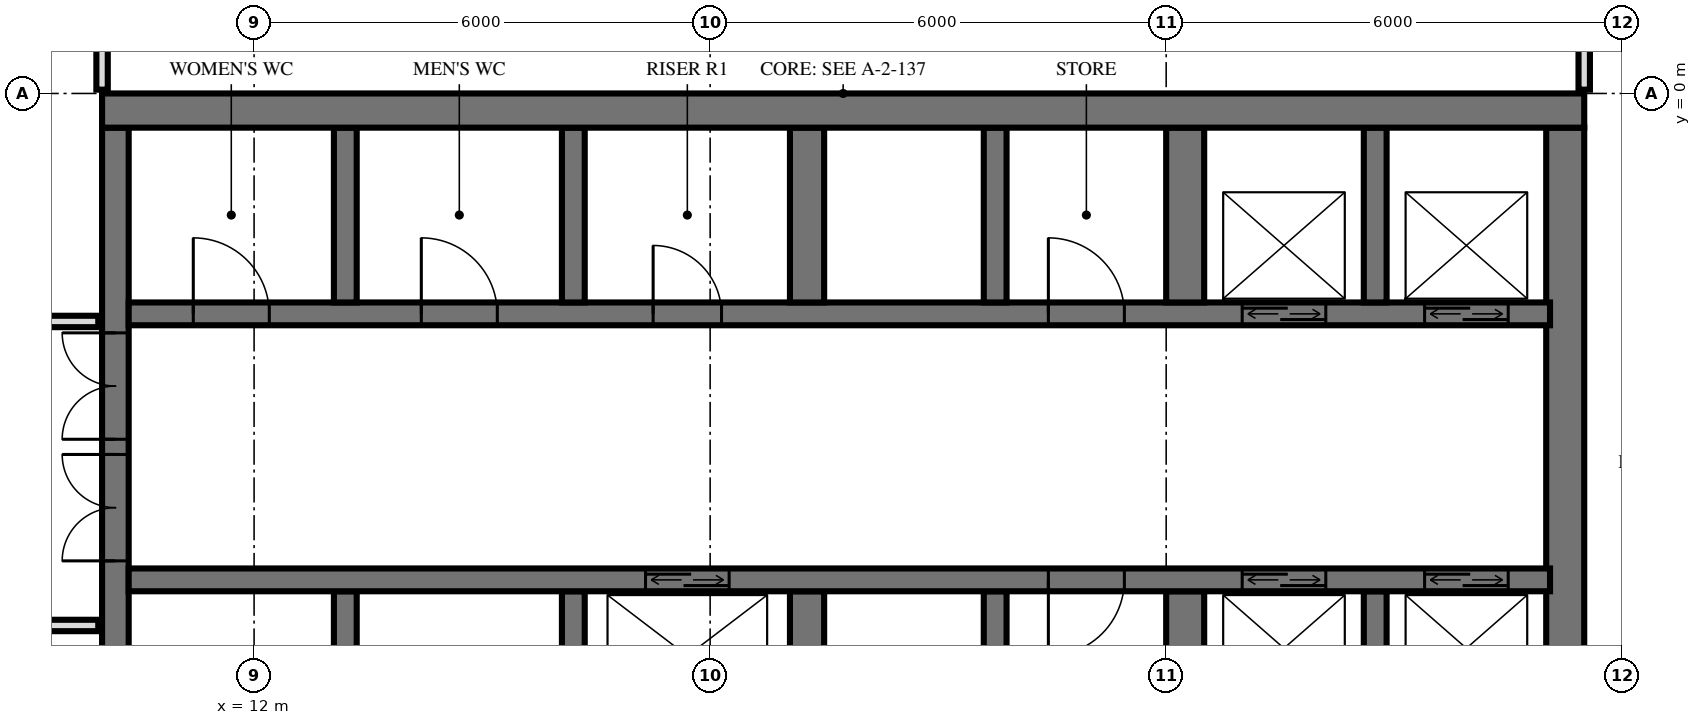
"""IFC4 building model, lengths in metres.
Left out: names, types, materials, properties, quantities, classifications, styles, units other than length and angle.
Written with IfcOpenShell. Run it as: python <this file> out.ifc"""

import sys

from ifc_helpers import new_model, si_unit, direction, frame, frame_2d, origin, place, context, subcontext, project, spatial, rectangle, extrude, element, fill, save


model = new_model("IFC4")
c1 = context("Model", 3, precision=1e-05, world=origin(), true_north=direction((0.0, 1.0)))
c2 = subcontext(c1, "Body", "Model", "MODEL_VIEW")
j1 = project(units=[si_unit("LENGTHUNIT", "METRE"), si_unit("PLANEANGLEUNIT", "RADIAN")], contexts=[c1])
p1 = place(None, origin())
s1 = spatial("IfcSite", under=j1, at=p1, CompositionType="ELEMENT")
p2 = place(p1, origin())
s2 = spatial("IfcBuilding", under=s1, at=p2, CompositionType="ELEMENT")
p3 = place(p2, frame((0.0, 0.0, 60.0)))
s3 = spatial("IfcBuildingStorey", under=s2, at=p3, CompositionType="ELEMENT", Elevation=60.0)
p4 = place(p3, frame((10.0, -0.225, 0.0), z_axis=(0.0, 0.0, 1.0), x_axis=(1.0, 0.0, 0.0)))
e1 = element("IfcWall", 1, at=p4, inside=s3, PredefinedType="SHEAR", context=c2, shape_type="SweptSolid", body=[
    extrude(rectangle(XDim=19.5, YDim=0.45, at=frame_2d((9.75, 0.0))), origin(), (0.0, 0.0, 1.0), 3.6),
])
p5 = place(p3, frame((10.175, -14.55, 0.0), z_axis=(0.0, 0.0, 1.0), x_axis=(0.0, 1.0, 0.0)))
e2 = element("IfcWall", 2, at=p5, inside=s3, PredefinedType="SHEAR", context=c2, shape_type="SweptSolid", body=[
    extrude(rectangle(XDim=14.1, YDim=0.35, at=frame_2d((7.05, 0.0))), origin(), (0.0, 0.0, 1.0), 3.6),
])
p6 = place(p5, frame((8.4, 0.0, 0.0)))
e3 = element("IfcOpeningElement", 3, at=p6, cuts=e2, PredefinedType="OPENING", context=c2, shape_type="SweptSolid", body=[
    extrude(rectangle(XDim=1.4, YDim=2.4, at=frame_2d((0.7, 1.2))), frame((0.0, 0.185, 0.0), z_axis=(0.0, -1.0, 0.0), x_axis=(1.0, 0.0, 0.0)), (0.0, 0.0, 1.0), 0.37),
])
p7 = place(p5, frame((10.0, 0.0, 0.0)))
e4 = element("IfcOpeningElement", 4, at=p7, cuts=e2, PredefinedType="OPENING", context=c2, shape_type="SweptSolid", body=[
    extrude(rectangle(XDim=1.4, YDim=2.4, at=frame_2d((0.7, 1.2))), frame((0.0, 0.185, 0.0), z_axis=(0.0, -1.0, 0.0), x_axis=(1.0, 0.0, 0.0)), (0.0, 0.0, 1.0), 0.37),
])
p8 = place(p5, frame((4.0, 0.0, 0.0)))
e5 = element("IfcOpeningElement", 5, at=p8, cuts=e2, PredefinedType="OPENING", context=c2, shape_type="SweptSolid", body=[
    extrude(rectangle(XDim=1.2, YDim=2.1, at=frame_2d((0.6, 1.05))), frame((0.0, 0.185, 0.0), z_axis=(0.0, -1.0, 0.0), x_axis=(1.0, 0.0, 0.0)), (0.0, 0.0, 1.0), 0.37),
])
p9 = place(p3, frame((29.25, -14.55, 0.0), z_axis=(0.0, 0.0, 1.0), x_axis=(0.0, 1.0, 0.0)))
e6 = element("IfcWall", 6, at=p9, inside=s3, PredefinedType="SHEAR", context=c2, shape_type="SweptSolid", body=[
    extrude(rectangle(XDim=14.1, YDim=0.5, at=frame_2d((7.05, 0.0))), origin(), (0.0, 0.0, 1.0), 3.6),
])
p10 = place(p3, frame((10.35, -2.9, 0.0), z_axis=(0.0, 0.0, 1.0), x_axis=(1.0, 0.0, 0.0)))
e7 = element("IfcWall", 7, at=p10, inside=s3, PredefinedType="SHEAR", context=c2, shape_type="SweptSolid", body=[
    extrude(rectangle(XDim=18.7, YDim=0.3, at=frame_2d((9.35, 0.0))), origin(), (0.0, 0.0, 1.0), 3.6),
])
p11 = place(p10, frame((14.65, 0.0, 0.0)))
e8 = element("IfcOpeningElement", 8, at=p11, cuts=e7, PredefinedType="OPENING", context=c2, shape_type="SweptSolid", body=[
    extrude(rectangle(XDim=1.1, YDim=2.1, at=frame_2d((0.55, 1.05))), frame((0.0, 0.16, 0.0), z_axis=(0.0, -1.0, 0.0), x_axis=(1.0, 0.0, 0.0)), (0.0, 0.0, 1.0), 0.32),
])
p12 = place(p10, frame((17.05, 0.0, 0.0)))
e9 = element("IfcOpeningElement", 9, at=p12, cuts=e7, PredefinedType="OPENING", context=c2, shape_type="SweptSolid", body=[
    extrude(rectangle(XDim=1.1, YDim=2.1, at=frame_2d((0.55, 1.05))), frame((0.0, 0.16, 0.0), z_axis=(0.0, -1.0, 0.0), x_axis=(1.0, 0.0, 0.0)), (0.0, 0.0, 1.0), 0.32),
])
p13 = place(p10, frame((6.9, 0.0, 0.0)))
e10 = element("IfcOpeningElement", 10, at=p13, cuts=e7, PredefinedType="OPENING", context=c2, shape_type="SweptSolid", body=[
    extrude(rectangle(XDim=0.9, YDim=2.1, at=frame_2d((0.45, 1.05))), frame((0.0, 0.16, 0.0), z_axis=(0.0, -1.0, 0.0), x_axis=(1.0, 0.0, 0.0)), (0.0, 0.0, 1.0), 0.32),
])
p14 = place(p10, frame((0.85, 0.0, 0.0)))
e11 = element("IfcOpeningElement", 11, at=p14, cuts=e7, PredefinedType="OPENING", context=c2, shape_type="SweptSolid", body=[
    extrude(rectangle(XDim=1.0, YDim=2.1, at=frame_2d((0.5, 1.05))), frame((0.0, 0.16, 0.0), z_axis=(0.0, -1.0, 0.0), x_axis=(1.0, 0.0, 0.0)), (0.0, 0.0, 1.0), 0.32),
])
p15 = place(p10, frame((3.85, 0.0, 0.0)))
e12 = element("IfcOpeningElement", 12, at=p15, cuts=e7, PredefinedType="OPENING", context=c2, shape_type="SweptSolid", body=[
    extrude(rectangle(XDim=1.0, YDim=2.1, at=frame_2d((0.5, 1.05))), frame((0.0, 0.16, 0.0), z_axis=(0.0, -1.0, 0.0), x_axis=(1.0, 0.0, 0.0)), (0.0, 0.0, 1.0), 0.32),
])
p16 = place(p10, frame((12.1, 0.0, 0.0)))
e13 = element("IfcOpeningElement", 13, at=p16, cuts=e7, PredefinedType="OPENING", context=c2, shape_type="SweptSolid", body=[
    extrude(rectangle(XDim=1.0, YDim=2.1, at=frame_2d((0.5, 1.05))), frame((0.0, 0.16, 0.0), z_axis=(0.0, -1.0, 0.0), x_axis=(1.0, 0.0, 0.0)), (0.0, 0.0, 1.0), 0.32),
])
p17 = place(p3, frame((10.35, -6.4, 0.0), z_axis=(0.0, 0.0, 1.0), x_axis=(1.0, 0.0, 0.0)))
e14 = element("IfcWall", 14, at=p17, inside=s3, PredefinedType="SHEAR", context=c2, shape_type="SweptSolid", body=[
    extrude(rectangle(XDim=18.7, YDim=0.3, at=frame_2d((9.35, 0.0))), origin(), (0.0, 0.0, 1.0), 3.6),
])
p18 = place(p17, frame((14.65, 0.0, 0.0)))
e15 = element("IfcOpeningElement", 15, at=p18, cuts=e14, PredefinedType="OPENING", context=c2, shape_type="SweptSolid", body=[
    extrude(rectangle(XDim=1.1, YDim=2.1, at=frame_2d((0.55, 1.05))), frame((0.0, 0.16, 0.0), z_axis=(0.0, -1.0, 0.0), x_axis=(1.0, 0.0, 0.0)), (0.0, 0.0, 1.0), 0.32),
])
p19 = place(p17, frame((17.05, 0.0, 0.0)))
e16 = element("IfcOpeningElement", 16, at=p19, cuts=e14, PredefinedType="OPENING", context=c2, shape_type="SweptSolid", body=[
    extrude(rectangle(XDim=1.1, YDim=2.1, at=frame_2d((0.55, 1.05))), frame((0.0, 0.16, 0.0), z_axis=(0.0, -1.0, 0.0), x_axis=(1.0, 0.0, 0.0)), (0.0, 0.0, 1.0), 0.32),
])
p20 = place(p17, frame((6.8, 0.0, 0.0)))
e17 = element("IfcOpeningElement", 17, at=p20, cuts=e14, PredefinedType="OPENING", context=c2, shape_type="SweptSolid", body=[
    extrude(rectangle(XDim=1.1, YDim=2.1, at=frame_2d((0.55, 1.05))), frame((0.0, 0.16, 0.0), z_axis=(0.0, -1.0, 0.0), x_axis=(1.0, 0.0, 0.0)), (0.0, 0.0, 1.0), 0.32),
])
p21 = place(p17, frame((12.1, 0.0, 0.0)))
e18 = element("IfcOpeningElement", 18, at=p21, cuts=e14, PredefinedType="OPENING", context=c2, shape_type="SweptSolid", body=[
    extrude(rectangle(XDim=1.0, YDim=2.1, at=frame_2d((0.5, 1.05))), frame((0.0, 0.16, 0.0), z_axis=(0.0, -1.0, 0.0), x_axis=(1.0, 0.0, 0.0)), (0.0, 0.0, 1.0), 0.32),
])
for number, where, z_axis, x_axis in (
    (19, (13.2, -2.75, 0.0), (0.0, 0.0, 1.0), (0.0, 1.0, 0.0)),
    (20, (13.2, -8.85, 0.0), (0.0, 0.0, 1.0), (0.0, 1.0, 0.0)),
    (21, (16.2, -2.75, 0.0), (0.0, 0.0, 1.0), (0.0, 1.0, 0.0)),
    (22, (16.2, -8.85, 0.0), (0.0, 0.0, 1.0), (0.0, 1.0, 0.0)),
):
    element("IfcWall", number, at=place(p3, frame(where, z_axis=z_axis, x_axis=x_axis)), inside=s3, PredefinedType="SHEAR", context=c2, shape_type="SweptSolid", body=[
        extrude(rectangle(XDim=2.3, YDim=0.3, at=frame_2d((1.15, 0.0))), origin(), (0.0, 0.0, 1.0), 3.6),
    ])
for number, where, z_axis, x_axis in (
    (23, (19.275, -2.75, 0.0), (0.0, 0.0, 1.0), (0.0, 1.0, 0.0)),
    (24, (19.275, -8.85, 0.0), (0.0, 0.0, 1.0), (0.0, 1.0, 0.0)),
):
    element("IfcWall", number, at=place(p3, frame(where, z_axis=z_axis, x_axis=x_axis)), inside=s3, PredefinedType="SHEAR", context=c2, shape_type="SweptSolid", body=[
        extrude(rectangle(XDim=2.3, YDim=0.45, at=frame_2d((1.15, 0.0))), origin(), (0.0, 0.0, 1.0), 3.6),
    ])
for number, where, z_axis, x_axis in (
    (25, (21.75, -2.75, 0.0), (0.0, 0.0, 1.0), (0.0, 1.0, 0.0)),
    (26, (21.75, -8.85, 0.0), (0.0, 0.0, 1.0), (0.0, 1.0, 0.0)),
):
    element("IfcWall", number, at=place(p3, frame(where, z_axis=z_axis, x_axis=x_axis)), inside=s3, PredefinedType="SHEAR", context=c2, shape_type="SweptSolid", body=[
        extrude(rectangle(XDim=2.3, YDim=0.3, at=frame_2d((1.15, 0.0))), origin(), (0.0, 0.0, 1.0), 3.6),
    ])
for number, where, z_axis, x_axis in (
    (27, (24.25, -2.75, 0.0), (0.0, 0.0, 1.0), (0.0, 1.0, 0.0)),
    (28, (24.25, -8.85, 0.0), (0.0, 0.0, 1.0), (0.0, 1.0, 0.0)),
):
    element("IfcWall", number, at=place(p3, frame(where, z_axis=z_axis, x_axis=x_axis)), inside=s3, PredefinedType="SHEAR", context=c2, shape_type="SweptSolid", body=[
        extrude(rectangle(XDim=2.3, YDim=0.5, at=frame_2d((1.15, 0.0))), origin(), (0.0, 0.0, 1.0), 3.6),
    ])
for number, where, z_axis, x_axis in (
    (29, (26.75, -2.75, 0.0), (0.0, 0.0, 1.0), (0.0, 1.0, 0.0)),
    (30, (26.75, -8.85, 0.0), (0.0, 0.0, 1.0), (0.0, 1.0, 0.0)),
):
    element("IfcWall", number, at=place(p3, frame(where, z_axis=z_axis, x_axis=x_axis)), inside=s3, PredefinedType="SHEAR", context=c2, shape_type="SweptSolid", body=[
        extrude(rectangle(XDim=2.3, YDim=0.3, at=frame_2d((1.15, 0.0))), origin(), (0.0, 0.0, 1.0), 3.6),
    ])
p22 = place(p3, frame((29.5, 0.05, 0.0), z_axis=(0.0, 0.0, 1.0), x_axis=(0.0, 1.0, 0.0)))
e31 = element("IfcWall", 31, at=p22, inside=s3, PredefinedType="PARTITIONING", context=c2, shape_type="SweptSolid", body=[
    extrude(rectangle(XDim=0.827, YDim=0.15, at=frame_2d((0.414, 0.0))), origin(), (0.0, 0.0, 1.0), 3.32),
])
p23 = place(p3, frame((10.0, 0.05, 0.0), z_axis=(0.0, 0.0, 1.0), x_axis=(0.0, 1.0, 0.0)))
e32 = element("IfcWall", 32, at=p23, inside=s3, PredefinedType="PARTITIONING", context=c2, shape_type="SweptSolid", body=[
    extrude(rectangle(XDim=0.97, YDim=0.15, at=frame_2d((0.485, 0.0))), origin(), (0.0, 0.0, 1.0), 3.32),
])
p24 = place(p3, frame((-9.95, -7.0, 0.0), z_axis=(0.0, 0.0, 1.0), x_axis=(1.0, 0.0, 0.0)))
e33 = element("IfcWall", 33, at=p24, inside=s3, PredefinedType="PARTITIONING", context=c2, shape_type="SweptSolid", body=[
    extrude(rectangle(XDim=19.9, YDim=0.15, at=frame_2d((9.95, 0.0))), origin(), (0.0, 0.0, 1.0), 3.32),
])
p25 = place(p24, frame((9.45, 0.0, 0.0)))
e34 = element("IfcOpeningElement", 34, at=p25, cuts=e33, PredefinedType="OPENING", context=c2, shape_type="SweptSolid", body=[
    extrude(rectangle(XDim=1.0, YDim=2.1, at=frame_2d((0.5, 1.05))), frame((0.0, 0.085, 0.0), z_axis=(0.0, -1.0, 0.0), x_axis=(1.0, 0.0, 0.0)), (0.0, 0.0, 1.0), 0.17),
])
p26 = place(p24, frame((15.45, 0.0, 0.0)))
e35 = element("IfcOpeningElement", 35, at=p26, cuts=e33, PredefinedType="OPENING", context=c2, shape_type="SweptSolid", body=[
    extrude(rectangle(XDim=1.0, YDim=2.1, at=frame_2d((0.5, 1.05))), frame((0.0, 0.085, 0.0), z_axis=(0.0, -1.0, 0.0), x_axis=(1.0, 0.0, 0.0)), (0.0, 0.0, 1.0), 0.17),
])
p27 = place(p3, frame((-9.95, -3.0, 0.0), z_axis=(0.0, 0.0, 1.0), x_axis=(1.0, 0.0, 0.0)))
e36 = element("IfcWall", 36, at=p27, inside=s3, PredefinedType="PARTITIONING", context=c2, shape_type="SweptSolid", body=[
    extrude(rectangle(XDim=19.9, YDim=0.15, at=frame_2d((9.95, 0.0))), origin(), (0.0, 0.0, 1.0), 3.32),
])
p28 = place(p27, frame((0.95, 0.0, 0.0)))
e37 = element("IfcOpeningElement", 37, at=p28, cuts=e36, PredefinedType="OPENING", context=c2, shape_type="SweptSolid", body=[
    extrude(rectangle(XDim=1.0, YDim=2.1, at=frame_2d((0.5, 1.05))), frame((0.0, 0.085, 0.0), z_axis=(0.0, -1.0, 0.0), x_axis=(1.0, 0.0, 0.0)), (0.0, 0.0, 1.0), 0.17),
])
p29 = place(p27, frame((3.7, 0.0, 0.0)))
e38 = element("IfcOpeningElement", 38, at=p29, cuts=e36, PredefinedType="OPENING", context=c2, shape_type="SweptSolid", body=[
    extrude(rectangle(XDim=1.0, YDim=2.1, at=frame_2d((0.5, 1.05))), frame((0.0, 0.085, 0.0), z_axis=(0.0, -1.0, 0.0), x_axis=(1.0, 0.0, 0.0)), (0.0, 0.0, 1.0), 0.17),
])
p30 = place(p27, frame((7.95, 0.0, 0.0)))
e39 = element("IfcOpeningElement", 39, at=p30, cuts=e36, PredefinedType="OPENING", context=c2, shape_type="SweptSolid", body=[
    extrude(rectangle(XDim=1.0, YDim=2.1, at=frame_2d((0.5, 1.05))), frame((0.0, 0.085, 0.0), z_axis=(0.0, -1.0, 0.0), x_axis=(1.0, 0.0, 0.0)), (0.0, 0.0, 1.0), 0.17),
])
p31 = place(p27, frame((15.2, 0.0, 0.0)))
e40 = element("IfcOpeningElement", 40, at=p31, cuts=e36, PredefinedType="OPENING", context=c2, shape_type="SweptSolid", body=[
    extrude(rectangle(XDim=1.0, YDim=2.1, at=frame_2d((0.5, 1.05))), frame((0.0, 0.085, 0.0), z_axis=(0.0, -1.0, 0.0), x_axis=(1.0, 0.0, 0.0)), (0.0, 0.0, 1.0), 0.17),
])
p32 = place(p11, origin())
e41 = element("IfcDoor", 41, at=p32, inside=s3, OperationType="DOUBLE_DOOR_SLIDING", PredefinedType="USERDEFINED", context=c2, shape_type="SweptSolid", body=[
    extrude(rectangle(XDim=1.1, YDim=2.1, at=frame_2d((0.55, 1.05))), frame((0.0, 0.025, 0.0), z_axis=(0.0, -1.0, 0.0), x_axis=(1.0, 0.0, 0.0)), (0.0, 0.0, 1.0), 0.05),
])
fill(e8, e41)
p33 = place(p12, origin())
e42 = element("IfcDoor", 42, at=p33, inside=s3, OperationType="DOUBLE_DOOR_SLIDING", PredefinedType="USERDEFINED", context=c2, shape_type="SweptSolid", body=[
    extrude(rectangle(XDim=1.1, YDim=2.1, at=frame_2d((0.55, 1.05))), frame((0.0, 0.025, 0.0), z_axis=(0.0, -1.0, 0.0), x_axis=(1.0, 0.0, 0.0)), (0.0, 0.0, 1.0), 0.05),
])
fill(e9, e42)
p34 = place(p18, origin())
e43 = element("IfcDoor", 43, at=p34, inside=s3, OperationType="DOUBLE_DOOR_SLIDING", PredefinedType="USERDEFINED", context=c2, shape_type="SweptSolid", body=[
    extrude(rectangle(XDim=1.1, YDim=2.1, at=frame_2d((0.55, 1.05))), frame((0.0, 0.025, 0.0), z_axis=(0.0, -1.0, 0.0), x_axis=(1.0, 0.0, 0.0)), (0.0, 0.0, 1.0), 0.05),
])
fill(e15, e43)
p35 = place(p19, origin())
e44 = element("IfcDoor", 44, at=p35, inside=s3, OperationType="DOUBLE_DOOR_SLIDING", PredefinedType="USERDEFINED", context=c2, shape_type="SweptSolid", body=[
    extrude(rectangle(XDim=1.1, YDim=2.1, at=frame_2d((0.55, 1.05))), frame((0.0, 0.025, 0.0), z_axis=(0.0, -1.0, 0.0), x_axis=(1.0, 0.0, 0.0)), (0.0, 0.0, 1.0), 0.05),
])
fill(e16, e44)
p36 = place(p20, origin())
e45 = element("IfcDoor", 45, at=p36, inside=s3, OperationType="DOUBLE_DOOR_SLIDING", PredefinedType="USERDEFINED", context=c2, shape_type="SweptSolid", body=[
    extrude(rectangle(XDim=1.1, YDim=2.1, at=frame_2d((0.55, 1.05))), frame((0.0, 0.025, 0.0), z_axis=(0.0, -1.0, 0.0), x_axis=(1.0, 0.0, 0.0)), (0.0, 0.0, 1.0), 0.05),
])
fill(e17, e45)
p37 = place(p6, origin())
e46 = element("IfcDoor", 46, at=p37, inside=s3, OperationType="DOUBLE_DOOR_SINGLE_SWING", PredefinedType="DOOR", context=c2, shape_type="SweptSolid", body=[
    extrude(rectangle(XDim=1.4, YDim=2.4, at=frame_2d((0.7, 1.2))), frame((0.0, 0.025, 0.0), z_axis=(0.0, -1.0, 0.0), x_axis=(1.0, 0.0, 0.0)), (0.0, 0.0, 1.0), 0.05),
])
fill(e3, e46)
p38 = place(p7, origin())
e47 = element("IfcDoor", 47, at=p38, inside=s3, OperationType="DOUBLE_DOOR_SINGLE_SWING", PredefinedType="DOOR", context=c2, shape_type="SweptSolid", body=[
    extrude(rectangle(XDim=1.4, YDim=2.4, at=frame_2d((0.7, 1.2))), frame((0.0, 0.025, 0.0), z_axis=(0.0, -1.0, 0.0), x_axis=(1.0, 0.0, 0.0)), (0.0, 0.0, 1.0), 0.05),
])
fill(e4, e47)
p39 = place(p13, origin())
e48 = element("IfcDoor", 48, at=p39, inside=s3, OperationType="SINGLE_SWING_RIGHT", PredefinedType="DOOR", context=c2, shape_type="SweptSolid", body=[
    extrude(rectangle(XDim=0.9, YDim=2.1, at=frame_2d((0.45, 1.05))), frame((0.0, 0.025, 0.0), z_axis=(0.0, -1.0, 0.0), x_axis=(1.0, 0.0, 0.0)), (0.0, 0.0, 1.0), 0.05),
])
fill(e10, e48)
p40 = place(p14, origin())
e49 = element("IfcDoor", 49, at=p40, inside=s3, OperationType="SINGLE_SWING_RIGHT", PredefinedType="DOOR", context=c2, shape_type="SweptSolid", body=[
    extrude(rectangle(XDim=1.0, YDim=2.1, at=frame_2d((0.5, 1.05))), frame((0.0, 0.025, 0.0), z_axis=(0.0, -1.0, 0.0), x_axis=(1.0, 0.0, 0.0)), (0.0, 0.0, 1.0), 0.05),
])
fill(e11, e49)
p41 = place(p15, origin())
e50 = element("IfcDoor", 50, at=p41, inside=s3, OperationType="SINGLE_SWING_RIGHT", PredefinedType="DOOR", context=c2, shape_type="SweptSolid", body=[
    extrude(rectangle(XDim=1.0, YDim=2.1, at=frame_2d((0.5, 1.05))), frame((0.0, 0.025, 0.0), z_axis=(0.0, -1.0, 0.0), x_axis=(1.0, 0.0, 0.0)), (0.0, 0.0, 1.0), 0.05),
])
fill(e12, e50)
p42 = place(p16, origin())
e51 = element("IfcDoor", 51, at=p42, inside=s3, OperationType="SINGLE_SWING_RIGHT", PredefinedType="DOOR", context=c2, shape_type="SweptSolid", body=[
    extrude(rectangle(XDim=1.0, YDim=2.1, at=frame_2d((0.5, 1.05))), frame((0.0, 0.025, 0.0), z_axis=(0.0, -1.0, 0.0), x_axis=(1.0, 0.0, 0.0)), (0.0, 0.0, 1.0), 0.05),
])
fill(e13, e51)
p43 = place(p21, frame((0.5, 0.0, 0.0), z_axis=(0.0, 0.0, 1.0), x_axis=(-1.0, 0.0, 0.0)))
e52 = element("IfcDoor", 52, at=p43, inside=s3, OperationType="SINGLE_SWING_LEFT", PredefinedType="DOOR", context=c2, shape_type="SweptSolid", body=[
    extrude(rectangle(XDim=1.0, YDim=2.1, at=frame_2d((0.0, 1.05))), frame((0.0, -0.025, 0.0), z_axis=(0.0, 1.0, 0.0), x_axis=(-1.0, 0.0, 0.0)), (0.0, 0.0, 1.0), 0.05),
])
fill(e18, e52)
save(model, sys.argv[1])
